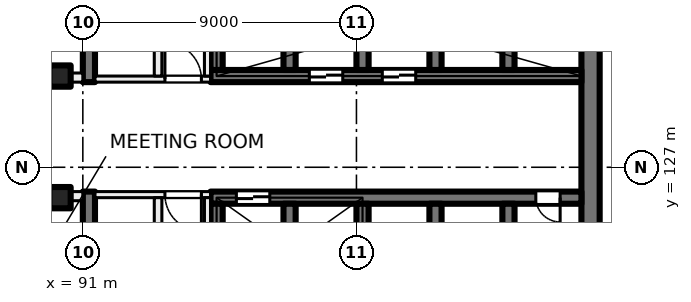
"""IFC4 building model, lengths in metres.
Left out: names, types, materials, properties, quantities, classifications, styles, units other than length and angle.
Written with IfcOpenShell. Run it as: python <this file> out.ifc"""

import sys

from ifc_helpers import new_model, si_unit, direction, frame, frame_2d, origin, origin_2d, place, context, subcontext, project, spatial, rectangle, extrude, element, fill, save


model = new_model("IFC4")
c1 = context("Model", 3, precision=1e-05, world=origin(), true_north=direction((0.0, 1.0)))
c2 = subcontext(c1, "Body", "Model", "MODEL_VIEW")
j1 = project(units=[si_unit("LENGTHUNIT", "METRE"), si_unit("PLANEANGLEUNIT", "RADIAN")], contexts=[c1])
p1 = place(None, origin())
s1 = spatial("IfcSite", under=j1, at=p1, CompositionType="ELEMENT")
p2 = place(p1, origin())
s2 = spatial("IfcBuilding", under=s1, at=p2, CompositionType="ELEMENT")
p3 = place(p2, frame((0.0, 0.0, 35.5)))
s3 = spatial("IfcBuildingStorey", under=s2, at=p3, CompositionType="ELEMENT", Elevation=35.5)
for number, where, z_axis, x_axis in (
    (1, (90.25, 130.0, 0.0), (0.0, 0.0, 1.0), (1.0, 0.0, 0.0)),
    (2, (90.25, 126.0, 0.0), (0.0, 0.0, 1.0), (1.0, 0.0, 0.0)),
):
    element("IfcColumn", number, at=place(p3, frame(where, z_axis=z_axis, x_axis=x_axis)), inside=s3, PredefinedType="COLUMN", context=c2, shape_type="SweptSolid", body=[
        extrude(rectangle(XDim=0.7, YDim=0.7, at=origin_2d()), origin(), (0.0, 0.0, 1.0), 4.0),
    ])
p4 = place(p3, frame((107.7, 135.2, 0.0), z_axis=(0.0, 0.0, 1.0), x_axis=(0.0, -1.0, 0.0)))
e3 = element("IfcWall", 3, at=p4, inside=s3, PredefinedType="SHEAR", context=c2, shape_type="SweptSolid", body=[
    extrude(rectangle(XDim=14.4, YDim=0.6, at=frame_2d((7.2, 0.0))), origin(), (0.0, 0.0, 1.0), 4.0),
])
p5 = place(p3, frame((107.4, 130.0, 0.0), z_axis=(0.0, 0.0, 1.0), x_axis=(-1.0, 0.0, 0.0)))
e4 = element("IfcWall", 4, at=p5, inside=s3, PredefinedType="SHEAR", context=c2, shape_type="SweptSolid", body=[
    extrude(rectangle(XDim=12.2, YDim=0.4, at=frame_2d((6.1, 0.0))), origin(), (0.0, 0.0, 1.0), 4.0),
])
p6 = place(p5, frame((5.45, 0.0, 0.0)))
e5 = element("IfcOpeningElement", 5, at=p6, cuts=e4, PredefinedType="OPENING", context=c2, shape_type="SweptSolid", body=[
    extrude(rectangle(XDim=1.1, YDim=2.1, at=frame_2d((0.55, 1.05))), frame((0.0, 0.21, 0.0), z_axis=(0.0, -1.0, 0.0), x_axis=(1.0, 0.0, 0.0)), (0.0, 0.0, 1.0), 0.42),
])
p7 = place(p5, frame((7.85, 0.0, 0.0)))
e6 = element("IfcOpeningElement", 6, at=p7, cuts=e4, PredefinedType="OPENING", context=c2, shape_type="SweptSolid", body=[
    extrude(rectangle(XDim=1.1, YDim=2.1, at=frame_2d((0.55, 1.05))), frame((0.0, 0.21, 0.0), z_axis=(0.0, -1.0, 0.0), x_axis=(1.0, 0.0, 0.0)), (0.0, 0.0, 1.0), 0.42),
])
for number, where, z_axis, x_axis in (
    (7, (105.0, 133.2, 0.0), (0.0, 0.0, 1.0), (0.0, -1.0, 0.0)),
    (8, (102.6, 133.2, 0.0), (0.0, 0.0, 1.0), (0.0, -1.0, 0.0)),
    (9, (100.2, 133.2, 0.0), (0.0, 0.0, 1.0), (0.0, -1.0, 0.0)),
    (10, (97.8, 133.2, 0.0), (0.0, 0.0, 1.0), (0.0, -1.0, 0.0)),
    (11, (95.4, 133.2, 0.0), (0.0, 0.0, 1.0), (0.0, -1.0, 0.0)),
):
    element("IfcWall", number, at=place(p3, frame(where, z_axis=z_axis, x_axis=x_axis)), inside=s3, PredefinedType="SHEAR", context=c2, shape_type="SweptSolid", body=[
        extrude(rectangle(XDim=3.0, YDim=0.4, at=frame_2d((1.5, 0.0))), origin(), (0.0, 0.0, 1.0), 4.0),
    ])
p8 = place(p3, frame((107.4, 126.0, 0.0), z_axis=(0.0, 0.0, 1.0), x_axis=(-1.0, 0.0, 0.0)))
e12 = element("IfcWall", 12, at=p8, inside=s3, PredefinedType="SHEAR", context=c2, shape_type="SweptSolid", body=[
    extrude(rectangle(XDim=12.2, YDim=0.4, at=frame_2d((6.1, 0.0))), origin(), (0.0, 0.0, 1.0), 4.0),
])
p9 = place(p8, frame((10.25, 0.0, 0.0)))
e13 = element("IfcOpeningElement", 13, at=p9, cuts=e12, PredefinedType="OPENING", context=c2, shape_type="SweptSolid", body=[
    extrude(rectangle(XDim=1.1, YDim=2.1, at=frame_2d((0.55, 1.05))), frame((0.0, 0.21, 0.0), z_axis=(0.0, -1.0, 0.0), x_axis=(1.0, 0.0, 0.0)), (0.0, 0.0, 1.0), 0.42),
])
p10 = place(p8, frame((0.7, 0.0, 0.0)))
e14 = element("IfcOpeningElement", 14, at=p10, cuts=e12, PredefinedType="OPENING", context=c2, shape_type="SweptSolid", body=[
    extrude(rectangle(XDim=0.8, YDim=2.1, at=frame_2d((0.4, 1.05))), frame((0.0, 0.21, 0.0), z_axis=(0.0, -1.0, 0.0), x_axis=(1.0, 0.0, 0.0)), (0.0, 0.0, 1.0), 0.42),
])
for number, where, z_axis, x_axis in (
    (15, (105.0, 125.8, 0.0), (0.0, 0.0, 1.0), (0.0, -1.0, 0.0)),
    (16, (102.6, 125.8, 0.0), (0.0, 0.0, 1.0), (0.0, -1.0, 0.0)),
    (17, (100.2, 125.8, 0.0), (0.0, 0.0, 1.0), (0.0, -1.0, 0.0)),
    (18, (97.8, 125.8, 0.0), (0.0, 0.0, 1.0), (0.0, -1.0, 0.0)),
    (19, (95.4, 125.8, 0.0), (0.0, 0.0, 1.0), (0.0, -1.0, 0.0)),
):
    element("IfcWall", number, at=place(p3, frame(where, z_axis=z_axis, x_axis=x_axis)), inside=s3, PredefinedType="SHEAR", context=c2, shape_type="SweptSolid", body=[
        extrude(rectangle(XDim=3.0, YDim=0.4, at=frame_2d((1.5, 0.0))), origin(), (0.0, 0.0, 1.0), 4.0),
    ])
for number, where, z_axis, x_axis in (
    (20, (91.2, 138.4, 0.0), (0.0, 0.0, 1.0), (0.0, -1.0, 0.0)),
    (21, (91.2, 126.2, 0.0), (0.0, 0.0, 1.0), (0.0, -1.0, 0.0)),
):
    element("IfcWall", number, at=place(p3, frame(where, z_axis=z_axis, x_axis=x_axis)), inside=s3, PredefinedType="SHEAR", context=c2, shape_type="SweptSolid", body=[
        extrude(rectangle(XDim=8.6, YDim=0.4, at=frame_2d((4.3, 0.0))), origin(), (0.0, 0.0, 1.0), 4.0),
    ])
p11 = place(p3, frame((95.2, 126.1, 0.0), z_axis=(0.0, 0.0, 1.0), x_axis=(-1.0, 0.0, 0.0)))
e22 = element("IfcWall", 22, at=p11, inside=s3, PredefinedType="PARTITIONING", context=c2, shape_type="SweptSolid", body=[
    extrude(rectangle(XDim=3.8, YDim=0.2, at=frame_2d((1.9, 0.0))), origin(), (0.0, 0.0, 1.0), 3.625),
])
p12 = place(p11, frame((0.3, 0.0, 0.0)))
e23 = element("IfcOpeningElement", 23, at=p12, cuts=e22, PredefinedType="OPENING", context=c2, shape_type="SweptSolid", body=[
    extrude(rectangle(XDim=1.2, YDim=2.1, at=frame_2d((0.6, 1.05))), frame((0.0, 0.11, 0.0), z_axis=(0.0, -1.0, 0.0), x_axis=(1.0, 0.0, 0.0)), (0.0, 0.0, 1.0), 0.22),
])
p13 = place(p3, frame((95.1, 117.6, 0.0), z_axis=(0.0, 0.0, 1.0), x_axis=(0.0, 1.0, 0.0)))
e24 = element("IfcWall", 24, at=p13, inside=s3, PredefinedType="PARTITIONING", context=c2, shape_type="SweptSolid", body=[
    extrude(rectangle(XDim=8.4, YDim=0.2, at=frame_2d((4.2, 0.0))), origin(), (0.0, 0.0, 1.0), 3.625),
])
p14 = place(p13, frame((1.65, 0.0, 0.0)))
e25 = element("IfcOpeningElement", 25, at=p14, cuts=e24, PredefinedType="OPENING", context=c2, shape_type="SweptSolid", body=[
    extrude(rectangle(XDim=1.5, YDim=2.1, at=frame_2d((0.75, 1.05))), frame((0.0, 0.11, 0.0), z_axis=(0.0, -1.0, 0.0), x_axis=(1.0, 0.0, 0.0)), (0.0, 0.0, 1.0), 0.22),
])
p15 = place(p3, frame((93.475, 117.6, 0.0), z_axis=(0.0, 0.0, 1.0), x_axis=(0.0, 1.0, 0.0)))
e26 = element("IfcWall", 26, at=p15, inside=s3, PredefinedType="PARTITIONING", context=c2, shape_type="SweptSolid", body=[
    extrude(rectangle(XDim=8.4, YDim=0.25, at=frame_2d((4.2, 0.0))), origin(), (0.0, 0.0, 1.0), 3.625),
])
p16 = place(p15, frame((5.925, 0.0, 0.0)))
e27 = element("IfcOpeningElement", 27, at=p16, cuts=e26, PredefinedType="OPENING", context=c2, shape_type="SweptSolid", body=[
    extrude(rectangle(XDim=0.8, YDim=2.1, at=frame_2d((0.4, 1.05))), frame((0.0, 0.135, 0.0), z_axis=(0.0, -1.0, 0.0), x_axis=(1.0, 0.0, 0.0)), (0.0, 0.0, 1.0), 0.27),
])
p17 = place(p15, frame((1.675, 0.0, 0.0)))
e28 = element("IfcOpeningElement", 28, at=p17, cuts=e26, PredefinedType="OPENING", context=c2, shape_type="SweptSolid", body=[
    extrude(rectangle(XDim=0.8, YDim=2.1, at=frame_2d((0.4, 1.05))), frame((0.0, 0.135, 0.0), z_axis=(0.0, -1.0, 0.0), x_axis=(1.0, 0.0, 0.0)), (0.0, 0.0, 1.0), 0.27),
])
p18 = place(p3, frame((91.4, 129.9, 0.0), z_axis=(0.0, 0.0, 1.0), x_axis=(1.0, 0.0, 0.0)))
e29 = element("IfcWall", 29, at=p18, inside=s3, PredefinedType="PARTITIONING", context=c2, shape_type="SweptSolid", body=[
    extrude(rectangle(XDim=3.8, YDim=0.2, at=frame_2d((1.9, 0.0))), origin(), (0.0, 0.0, 1.0), 3.625),
])
p19 = place(p18, frame((2.3, 0.0, 0.0)))
e30 = element("IfcOpeningElement", 30, at=p19, cuts=e29, PredefinedType="OPENING", context=c2, shape_type="SweptSolid", body=[
    extrude(rectangle(XDim=1.2, YDim=2.1, at=frame_2d((0.6, 1.05))), frame((0.0, 0.11, 0.0), z_axis=(0.0, -1.0, 0.0), x_axis=(1.0, 0.0, 0.0)), (0.0, 0.0, 1.0), 0.22),
])
p20 = place(p3, frame((95.1, 130.0, 0.0), z_axis=(0.0, 0.0, 1.0), x_axis=(0.0, 1.0, 0.0)))
e31 = element("IfcWall", 31, at=p20, inside=s3, PredefinedType="PARTITIONING", context=c2, shape_type="SweptSolid", body=[
    extrude(rectangle(XDim=8.4, YDim=0.2, at=frame_2d((4.2, 0.0))), origin(), (0.0, 0.0, 1.0), 3.625),
])
p21 = place(p20, frame((5.25, 0.0, 0.0)))
e32 = element("IfcOpeningElement", 32, at=p21, cuts=e31, PredefinedType="OPENING", context=c2, shape_type="SweptSolid", body=[
    extrude(rectangle(XDim=1.5, YDim=2.1, at=frame_2d((0.75, 1.05))), frame((0.0, 0.11, 0.0), z_axis=(0.0, -1.0, 0.0), x_axis=(1.0, 0.0, 0.0)), (0.0, 0.0, 1.0), 0.22),
])
p22 = place(p3, frame((93.475, 130.0, 0.0), z_axis=(0.0, 0.0, 1.0), x_axis=(0.0, 1.0, 0.0)))
e33 = element("IfcWall", 33, at=p22, inside=s3, PredefinedType="PARTITIONING", context=c2, shape_type="SweptSolid", body=[
    extrude(rectangle(XDim=8.4, YDim=0.25, at=frame_2d((4.2, 0.0))), origin(), (0.0, 0.0, 1.0), 3.625),
])
p23 = place(p22, frame((0.975, 0.0, 0.0)))
e34 = element("IfcOpeningElement", 34, at=p23, cuts=e33, PredefinedType="OPENING", context=c2, shape_type="SweptSolid", body=[
    extrude(rectangle(XDim=0.8, YDim=2.1, at=frame_2d((0.4, 1.05))), frame((0.0, 0.135, 0.0), z_axis=(0.0, -1.0, 0.0), x_axis=(1.0, 0.0, 0.0)), (0.0, 0.0, 1.0), 0.27),
])
p24 = place(p22, frame((5.225, 0.0, 0.0)))
e35 = element("IfcOpeningElement", 35, at=p24, cuts=e33, PredefinedType="OPENING", context=c2, shape_type="SweptSolid", body=[
    extrude(rectangle(XDim=0.8, YDim=2.1, at=frame_2d((0.4, 1.05))), frame((0.0, 0.135, 0.0), z_axis=(0.0, -1.0, 0.0), x_axis=(1.0, 0.0, 0.0)), (0.0, 0.0, 1.0), 0.27),
])
p25 = place(p3, frame((72.5, 129.95, 0.0), z_axis=(0.0, 0.0, 1.0), x_axis=(1.0, 0.0, 0.0)))
e36 = element("IfcWall", 36, at=p25, inside=s3, PredefinedType="PARTITIONING", context=c2, shape_type="SweptSolid", body=[
    extrude(rectangle(XDim=18.5, YDim=0.3, at=frame_2d((9.25, 0.0))), origin(), (0.0, 0.0, 1.0), 3.625),
])
p26 = place(p25, frame((14.375, 0.0, 0.0)))
e37 = element("IfcOpeningElement", 37, at=p26, cuts=e36, PredefinedType="OPENING", context=c2, shape_type="SweptSolid", body=[
    extrude(rectangle(XDim=1.0, YDim=2.1, at=frame_2d((0.5, 1.05))), frame((0.0, 0.16, 0.0), z_axis=(0.0, -1.0, 0.0), x_axis=(1.0, 0.0, 0.0)), (0.0, 0.0, 1.0), 0.32),
])
p27 = place(p25, frame((3.475, 0.0, 0.0)))
e38 = element("IfcOpeningElement", 38, at=p27, cuts=e36, PredefinedType="OPENING", context=c2, shape_type="SweptSolid", body=[
    extrude(rectangle(XDim=1.8, YDim=2.1, at=frame_2d((0.9, 1.05))), frame((0.0, 0.16, 0.0), z_axis=(0.0, -1.0, 0.0), x_axis=(1.0, 0.0, 0.0)), (0.0, 0.0, 1.0), 0.32),
])
p28 = place(p3, frame((91.0, 126.05, 0.0), z_axis=(0.0, 0.0, 1.0), x_axis=(-1.0, 0.0, 0.0)))
e39 = element("IfcWall", 39, at=p28, inside=s3, PredefinedType="PARTITIONING", context=c2, shape_type="SweptSolid", body=[
    extrude(rectangle(XDim=43.785, YDim=0.3, at=frame_2d((21.893, 0.0))), origin(), (0.0, 0.0, 1.0), 3.625),
])
p29 = place(p28, frame((2.025, 0.0, 0.0)))
e40 = element("IfcOpeningElement", 40, at=p29, cuts=e39, PredefinedType="OPENING", context=c2, shape_type="SweptSolid", body=[
    extrude(rectangle(XDim=1.2, YDim=2.1, at=frame_2d((0.6, 1.05))), frame((0.0, 0.16, 0.0), z_axis=(0.0, -1.0, 0.0), x_axis=(1.0, 0.0, 0.0)), (0.0, 0.0, 1.0), 0.32),
])
p30 = place(p28, frame((7.0, 0.0, 0.0)))
e41 = element("IfcOpeningElement", 41, at=p30, cuts=e39, PredefinedType="OPENING", context=c2, shape_type="SweptSolid", body=[
    extrude(rectangle(XDim=1.0, YDim=2.1, at=frame_2d((0.5, 1.05))), frame((0.0, 0.16, 0.0), z_axis=(0.0, -1.0, 0.0), x_axis=(1.0, 0.0, 0.0)), (0.0, 0.0, 1.0), 0.32),
])
p31 = place(p28, frame((11.5, 0.0, 0.0)))
e42 = element("IfcOpeningElement", 42, at=p31, cuts=e39, PredefinedType="OPENING", context=c2, shape_type="SweptSolid", body=[
    extrude(rectangle(XDim=1.0, YDim=2.1, at=frame_2d((0.5, 1.05))), frame((0.0, 0.16, 0.0), z_axis=(0.0, -1.0, 0.0), x_axis=(1.0, 0.0, 0.0)), (0.0, 0.0, 1.0), 0.32),
])
p32 = place(p28, frame((16.0, 0.0, 0.0)))
e43 = element("IfcOpeningElement", 43, at=p32, cuts=e39, PredefinedType="OPENING", context=c2, shape_type="SweptSolid", body=[
    extrude(rectangle(XDim=1.0, YDim=2.1, at=frame_2d((0.5, 1.05))), frame((0.0, 0.16, 0.0), z_axis=(0.0, -1.0, 0.0), x_axis=(1.0, 0.0, 0.0)), (0.0, 0.0, 1.0), 0.32),
])
p33 = place(p28, frame((20.5, 0.0, 0.0)))
e44 = element("IfcOpeningElement", 44, at=p33, cuts=e39, PredefinedType="OPENING", context=c2, shape_type="SweptSolid", body=[
    extrude(rectangle(XDim=1.0, YDim=2.1, at=frame_2d((0.5, 1.05))), frame((0.0, 0.16, 0.0), z_axis=(0.0, -1.0, 0.0), x_axis=(1.0, 0.0, 0.0)), (0.0, 0.0, 1.0), 0.32),
])
p34 = place(p28, frame((39.296, 0.0, 0.0)))
e45 = element("IfcOpeningElement", 45, at=p34, cuts=e39, PredefinedType="OPENING", context=c2, shape_type="SweptSolid", body=[
    extrude(rectangle(XDim=1.8, YDim=2.1, at=frame_2d((0.9, 1.05))), frame((0.0, 0.16, 0.0), z_axis=(0.0, -1.0, 0.0), x_axis=(1.0, 0.0, 0.0)), (0.0, 0.0, 1.0), 0.32),
])
p35 = place(p9, origin())
e46 = element("IfcDoor", 46, at=p35, inside=s3, OperationType="DOUBLE_DOOR_SLIDING", PredefinedType="DOOR", context=c2, shape_type="SweptSolid", body=[
    extrude(rectangle(XDim=1.1, YDim=2.1, at=frame_2d((0.55, 1.05))), frame((0.0, 0.025, 0.0), z_axis=(0.0, -1.0, 0.0), x_axis=(1.0, 0.0, 0.0)), (0.0, 0.0, 1.0), 0.05),
])
fill(e13, e46)
p36 = place(p6, origin())
e47 = element("IfcDoor", 47, at=p36, inside=s3, OperationType="DOUBLE_DOOR_SLIDING", PredefinedType="DOOR", context=c2, shape_type="SweptSolid", body=[
    extrude(rectangle(XDim=1.1, YDim=2.1, at=frame_2d((0.55, 1.05))), frame((0.0, 0.025, 0.0), z_axis=(0.0, -1.0, 0.0), x_axis=(1.0, 0.0, 0.0)), (0.0, 0.0, 1.0), 0.05),
])
fill(e5, e47)
p37 = place(p7, origin())
e48 = element("IfcDoor", 48, at=p37, inside=s3, OperationType="DOUBLE_DOOR_SLIDING", PredefinedType="DOOR", context=c2, shape_type="SweptSolid", body=[
    extrude(rectangle(XDim=1.1, YDim=2.1, at=frame_2d((0.55, 1.05))), frame((0.0, 0.025, 0.0), z_axis=(0.0, -1.0, 0.0), x_axis=(1.0, 0.0, 0.0)), (0.0, 0.0, 1.0), 0.05),
])
fill(e6, e48)
p38 = place(p10, origin())
e49 = element("IfcDoor", 49, at=p38, inside=s3, OperationType="SINGLE_SWING_LEFT", PredefinedType="DOOR", context=c2, shape_type="SweptSolid", body=[
    extrude(rectangle(XDim=0.8, YDim=2.1, at=frame_2d((0.4, 1.05))), frame((0.0, 0.025, 0.0), z_axis=(0.0, -1.0, 0.0), x_axis=(1.0, 0.0, 0.0)), (0.0, 0.0, 1.0), 0.05),
])
fill(e14, e49)
p39 = place(p12, origin())
e50 = element("IfcDoor", 50, at=p39, inside=s3, OperationType="DOUBLE_DOOR_SINGLE_SWING", PredefinedType="DOOR", context=c2, shape_type="SweptSolid", body=[
    extrude(rectangle(XDim=1.2, YDim=2.1, at=frame_2d((0.6, 1.05))), frame((0.0, 0.025, 0.0), z_axis=(0.0, -1.0, 0.0), x_axis=(1.0, 0.0, 0.0)), (0.0, 0.0, 1.0), 0.05),
])
fill(e23, e50)
p40 = place(p19, origin())
e51 = element("IfcDoor", 51, at=p40, inside=s3, OperationType="DOUBLE_DOOR_SINGLE_SWING", PredefinedType="DOOR", context=c2, shape_type="SweptSolid", body=[
    extrude(rectangle(XDim=1.2, YDim=2.1, at=frame_2d((0.6, 1.05))), frame((0.0, 0.025, 0.0), z_axis=(0.0, -1.0, 0.0), x_axis=(1.0, 0.0, 0.0)), (0.0, 0.0, 1.0), 0.05),
])
fill(e30, e51)
save(model, sys.argv[1])
